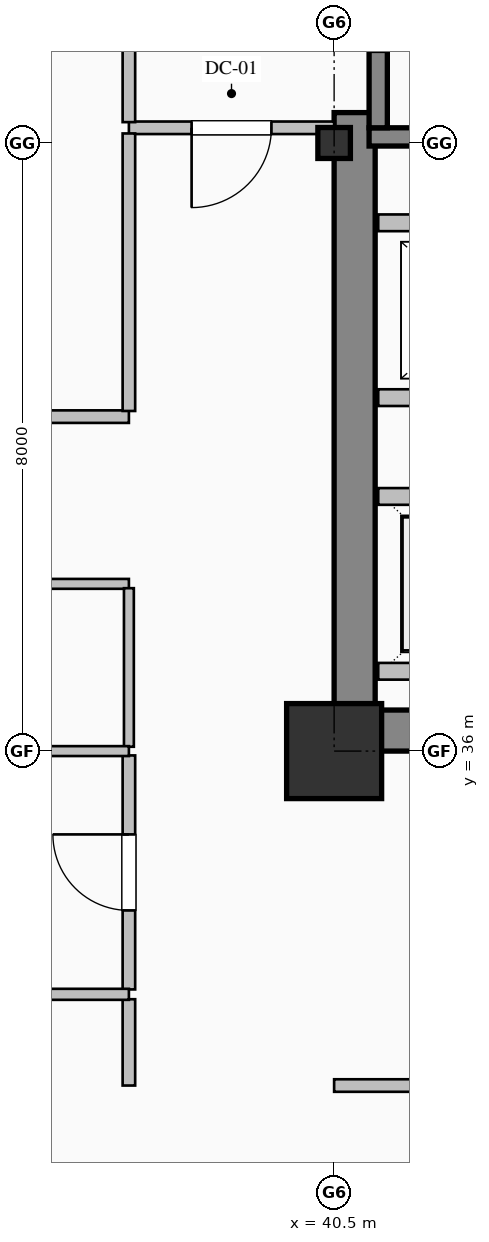
"""IFC4 building model, lengths in metres.
Left out: names, types, materials, properties, quantities, classifications, styles, units other than length and angle.
Written with IfcOpenShell. Run it as: python <this file> out.ifc"""

import sys

from ifc_helpers import new_model, si_unit, direction, frame, frame_2d, origin, origin_2d, place, context, subcontext, project, spatial, rectangle, hollow_rectangle, i_section, extrude, element, fill, save


model = new_model("IFC4")
c1 = context("Model", 3, precision=1e-05, world=origin(), true_north=direction((0.0, 1.0)))
c2 = subcontext(c1, "Body", "Model", "MODEL_VIEW")
j1 = project(units=[si_unit("LENGTHUNIT", "METRE"), si_unit("PLANEANGLEUNIT", "RADIAN")], contexts=[c1])
p1 = place(None, origin())
s1 = spatial("IfcSite", under=j1, at=p1, CompositionType="ELEMENT")
p2 = place(p1, origin())
s2 = spatial("IfcBuilding", under=s1, at=p2, CompositionType="ELEMENT")
p3 = place(p2, frame((0.0, 0.0, 44.2)))
s3 = spatial("IfcBuildingStorey", under=s2, at=p3, CompositionType="ELEMENT", Elevation=44.2)
p4 = place(p3, frame((40.77, 36.54, 0.0), z_axis=(0.0, 0.0, 1.0), x_axis=(0.0, 1.0, 0.0)))
e1 = element("IfcWall", 1, at=p4, inside=s3, PredefinedType="SHEAR", context=c2, shape_type="SweptSolid", body=[
    extrude(rectangle(XDim=7.86, YDim=0.54, at=frame_2d((3.93, 0.0))), origin(), (0.0, 0.0, 1.0), 3.75),
])
p5 = place(p3, frame((40.5, 36.27, 0.0), z_axis=(0.0, 0.0, 1.0), x_axis=(1.0, 0.0, 0.0)))
e2 = element("IfcWall", 2, at=p5, inside=s3, PredefinedType="SHEAR", context=c2, shape_type="SweptSolid", body=[
    extrude(rectangle(XDim=1.7, YDim=0.54, at=frame_2d((0.85, 0.0))), origin(), (0.0, 0.0, 1.0), 3.75),
])
p6 = place(p3, frame((40.5, 36.0, 0.0), z_axis=(0.0, 0.0, 1.0), x_axis=(1.0, 0.0, 0.0)))
e3 = element("IfcColumn", 3, at=p6, inside=s3, PredefinedType="COLUMN", context=c2, shape_type="SweptSolid", body=[
    extrude(hollow_rectangle(XDim=1.25, YDim=1.25, WallThickness=0.045, at=origin_2d()), origin(), (0.0, 0.0, 1.0), 4.0),
])
p7 = place(p3, frame((40.5, 44.0, 0.0), z_axis=(0.0, 0.0, 1.0), x_axis=(1.0, 0.0, 0.0)))
e4 = element("IfcColumn", 4, at=p7, inside=s3, PredefinedType="COLUMN", context=c2, shape_type="SweptSolid", body=[
    extrude(i_section(OverallWidth=0.407, OverallDepth=0.428, WebThickness=0.02, FlangeThickness=0.035, FilletRadius=0.022, at=origin_2d()), origin(), (0.0, 0.0, 1.0), 4.0),
])
p8 = place(p3, frame((49.04, 44.08, 0.0), z_axis=(0.0, 0.0, 1.0), x_axis=(-1.0, 0.0, 0.0)))
e5 = element("IfcWall", 5, at=p8, inside=s3, PredefinedType="SOLIDWALL", context=c2, shape_type="SweptSolid", body=[
    extrude(rectangle(XDim=8.08, YDim=0.24, at=frame_2d((4.04, 0.0))), origin(), (0.0, 0.0, 1.0), 4.0),
])
p9 = place(p3, frame((41.08, 47.35, 0.0), z_axis=(0.0, 0.0, 1.0), x_axis=(0.0, -1.0, 0.0)))
e6 = element("IfcWall", 6, at=p9, inside=s3, PredefinedType="SOLIDWALL", context=c2, shape_type="SweptSolid", body=[
    extrude(rectangle(XDim=3.15, YDim=0.24, at=frame_2d((1.575, 0.0))), origin(), (0.0, 0.0, 1.0), 4.0),
])
p10 = place(p9, frame((1.0, 0.0, 0.0)))
e7 = element("IfcOpeningElement", 7, at=p10, cuts=e6, PredefinedType="OPENING", context=c2, shape_type="SweptSolid", body=[
    extrude(rectangle(XDim=1.15, YDim=2.2, at=frame_2d((0.575, 1.1))), frame((0.0, 0.13, 0.0), z_axis=(0.0, -1.0, 0.0), x_axis=(1.0, 0.0, 0.0)), (0.0, 0.0, 1.0), 0.26),
])
p11 = place(p3, frame((49.32, 37.05, 0.0), z_axis=(0.0, 0.0, 1.0), x_axis=(-1.0, 0.0, 0.0)))
e8 = element("IfcWall", 8, at=p11, inside=s3, PredefinedType="PARTITIONING", context=c2, shape_type="SweptSolid", body=[
    extrude(rectangle(XDim=8.24, YDim=0.22, at=frame_2d((4.12, 0.0))), origin(), (0.0, 0.0, 1.0), 3.75),
])
p12 = place(p11, frame((6.37, 0.0, 0.0)))
e9 = element("IfcOpeningElement", 9, at=p12, cuts=e8, PredefinedType="OPENING", context=c2, shape_type="SweptSolid", body=[
    extrude(rectangle(XDim=1.1, YDim=2.2, at=frame_2d((0.55, 1.1))), frame((0.0, 0.12, 0.0), z_axis=(0.0, -1.0, 0.0), x_axis=(1.0, 0.0, 0.0)), (0.0, 0.0, 1.0), 0.24),
])
p13 = place(p11, frame((3.57, 0.0, 0.0)))
e10 = element("IfcOpeningElement", 10, at=p13, cuts=e8, PredefinedType="OPENING", context=c2, shape_type="SweptSolid", body=[
    extrude(rectangle(XDim=1.1, YDim=2.2, at=frame_2d((0.55, 1.1))), frame((0.0, 0.12, 0.0), z_axis=(0.0, -1.0, 0.0), x_axis=(1.0, 0.0, 0.0)), (0.0, 0.0, 1.0), 0.24),
])
p14 = place(p11, frame((0.77, 0.0, 0.0)))
e11 = element("IfcOpeningElement", 11, at=p14, cuts=e8, PredefinedType="OPENING", context=c2, shape_type="SweptSolid", body=[
    extrude(rectangle(XDim=1.1, YDim=2.2, at=frame_2d((0.55, 1.1))), frame((0.0, 0.12, 0.0), z_axis=(0.0, -1.0, 0.0), x_axis=(1.0, 0.0, 0.0)), (0.0, 0.0, 1.0), 0.24),
])
for number, where, z_axis, x_axis in (
    (12, (41.08, 39.35, 0.0), (0.0, 0.0, 1.0), (1.0, 0.0, 0.0)),
    (13, (49.32, 40.65, 0.0), (0.0, 0.0, 1.0), (-1.0, 0.0, 0.0)),
    (14, (41.08, 42.95, 0.0), (0.0, 0.0, 1.0), (1.0, 0.0, 0.0)),
):
    element("IfcWall", number, at=place(p3, frame(where, z_axis=z_axis, x_axis=x_axis)), inside=s3, PredefinedType="PARTITIONING", context=c2, shape_type="SweptSolid", body=[
        extrude(rectangle(XDim=8.24, YDim=0.22, at=frame_2d((4.12, 0.0))), origin(), (0.0, 0.0, 1.0), 3.75),
    ])
p15 = place(p3, frame((40.5, 44.2, 0.0), z_axis=(0.0, 0.0, 1.0), x_axis=(-1.0, 0.0, 0.0)))
e15 = element("IfcWall", 15, at=p15, inside=s3, PredefinedType="PARTITIONING", context=c2, shape_type="SweptSolid", body=[
    extrude(rectangle(XDim=2.7, YDim=0.165, at=frame_2d((1.35, 0.0))), origin(), (0.0, 0.0, 1.0), 3.75),
])
p16 = place(p15, frame((0.825, 0.0, 0.0)))
e16 = element("IfcOpeningElement", 16, at=p16, cuts=e15, PredefinedType="OPENING", context=c2, shape_type="SweptSolid", body=[
    extrude(rectangle(XDim=1.05, YDim=2.15, at=frame_2d((0.525, 1.075))), frame((0.0, 0.093, 0.0), z_axis=(0.0, -1.0, 0.0), x_axis=(1.0, 0.0, 0.0)), (0.0, 0.0, 1.0), 0.185),
])
p17 = place(p3, frame((37.8, 44.274, 0.0), z_axis=(0.0, 0.0, 1.0), x_axis=(0.0, 1.0, 0.0)))
e17 = element("IfcWall", 17, at=p17, inside=s3, PredefinedType="PARTITIONING", context=c2, shape_type="SweptSolid", body=[
    extrude(rectangle(XDim=3.051, YDim=0.165, at=frame_2d((1.525, 0.0))), origin(), (0.0, 0.0, 1.0), 3.75),
])
p18 = place(p3, frame((32.5, 40.4, 0.0), z_axis=(0.0, 0.0, 1.0), x_axis=(1.0, 0.0, 0.0)))
e18 = element("IfcWall", 18, at=p18, inside=s3, PredefinedType="PARTITIONING", context=c2, shape_type="SweptSolid", body=[
    extrude(rectangle(XDim=5.3, YDim=0.165, at=frame_2d((2.65, 0.0))), origin(), (0.0, 0.0, 1.0), 3.75),
])
p19 = place(p18, frame((2.1, 0.0, 0.0)))
e19 = element("IfcOpeningElement", 19, at=p19, cuts=e18, PredefinedType="OPENING", context=c2, shape_type="SweptSolid", body=[
    extrude(rectangle(XDim=1.1, YDim=2.2, at=frame_2d((0.55, 1.1))), frame((0.0, 0.093, 0.0), z_axis=(0.0, -1.0, 0.0), x_axis=(1.0, 0.0, 0.0)), (0.0, 0.0, 1.0), 0.185),
])
p20 = place(p3, frame((37.8, 38.2, 0.0), z_axis=(0.0, 0.0, 1.0), x_axis=(-1.0, 0.0, 0.0)))
e20 = element("IfcWall", 20, at=p20, inside=s3, PredefinedType="PARTITIONING", context=c2, shape_type="SweptSolid", body=[
    extrude(rectangle(XDim=28.8, YDim=0.13, at=frame_2d((14.4, 0.0))), origin(), (0.0, 0.0, 1.0), 3.75),
])
p21 = place(p20, frame((13.9, 0.0, 0.0)))
e21 = element("IfcOpeningElement", 21, at=p21, cuts=e20, PredefinedType="OPENING", context=c2, shape_type="SweptSolid", body=[
    extrude(rectangle(XDim=1.0, YDim=2.15, at=frame_2d((0.5, 1.075))), frame((0.0, 0.075, 0.0), z_axis=(0.0, -1.0, 0.0), x_axis=(1.0, 0.0, 0.0)), (0.0, 0.0, 1.0), 0.15),
])
p22 = place(p3, frame((37.8, 40.475, 0.0), z_axis=(0.0, 0.0, 1.0), x_axis=(0.0, 1.0, 0.0)))
e22 = element("IfcWall", 22, at=p22, inside=s3, PredefinedType="PARTITIONING", context=c2, shape_type="SweptSolid", body=[
    extrude(rectangle(XDim=3.651, YDim=0.165, at=frame_2d((1.825, 0.0))), origin(), (0.0, 0.0, 1.0), 3.75),
])
p23 = place(p3, frame((37.8, 31.6, 0.0), z_axis=(0.0, 0.0, 1.0), x_axis=(0.0, 1.0, 0.0)))
e23 = element("IfcWall", 23, at=p23, inside=s3, PredefinedType="PARTITIONING", context=c2, shape_type="SweptSolid", body=[
    extrude(rectangle(XDim=1.135, YDim=0.165, at=frame_2d((0.568, 0.0))), origin(), (0.0, 0.0, 1.0), 3.75),
])
p24 = place(p3, frame((37.8, 32.865, 0.0), z_axis=(0.0, 0.0, 1.0), x_axis=(0.0, 1.0, 0.0)))
e24 = element("IfcWall", 24, at=p24, inside=s3, PredefinedType="PARTITIONING", context=c2, shape_type="SweptSolid", body=[
    extrude(rectangle(XDim=3.079, YDim=0.165, at=frame_2d((1.539, 0.0))), origin(), (0.0, 0.0, 1.0), 3.75),
])
p25 = place(p24, frame((1.039, 0.0, 0.0)))
e25 = element("IfcOpeningElement", 25, at=p25, cuts=e24, PredefinedType="OPENING", context=c2, shape_type="SweptSolid", body=[
    extrude(rectangle(XDim=1.0, YDim=2.15, at=frame_2d((0.5, 1.075))), frame((0.0, 0.093, 0.0), z_axis=(0.0, -1.0, 0.0), x_axis=(1.0, 0.0, 0.0)), (0.0, 0.0, 1.0), 0.185),
])
p26 = place(p3, frame((37.8, 36.057, 0.0), z_axis=(0.0, 0.0, 1.0), x_axis=(0.0, 1.0, 0.0)))
e26 = element("IfcWall", 26, at=p26, inside=s3, PredefinedType="PARTITIONING", context=c2, shape_type="SweptSolid", body=[
    extrude(rectangle(XDim=2.086, YDim=0.13, at=frame_2d((1.043, 0.0))), origin(), (0.0, 0.0, 1.0), 3.75),
])
p27 = place(p3, frame((43.0, 31.6, 0.0), z_axis=(0.0, 0.0, 1.0), x_axis=(-1.0, 0.0, 0.0)))
e27 = element("IfcWall", 27, at=p27, inside=s3, PredefinedType="PARTITIONING", context=c2, shape_type="SweptSolid", body=[
    extrude(rectangle(XDim=2.5, YDim=0.165, at=frame_2d((1.25, 0.0))), origin(), (0.0, 0.0, 1.0), 3.75),
])
p28 = place(p3, frame((0.332, 32.8, 0.0), z_axis=(0.0, 0.0, 1.0), x_axis=(1.0, 0.0, 0.0)))
e28 = element("IfcWall", 28, at=p28, inside=s3, PredefinedType="PARTITIONING", context=c2, shape_type="SweptSolid", body=[
    extrude(rectangle(XDim=37.468, YDim=0.145, at=frame_2d((18.734, 0.0))), origin(), (0.0, 0.0, 1.0), 3.75),
])
p29 = place(p28, frame((18.234, 0.0, 0.0)))
e29 = element("IfcOpeningElement", 29, at=p29, cuts=e28, PredefinedType="OPENING", context=c2, shape_type="SweptSolid", body=[
    extrude(rectangle(XDim=1.0, YDim=2.15, at=frame_2d((0.5, 1.075))), frame((0.0, 0.083, 0.0), z_axis=(0.0, -1.0, 0.0), x_axis=(1.0, 0.0, 0.0)), (0.0, 0.0, 1.0), 0.165),
])
p30 = place(p3, frame((0.332, 36.0, 0.0), z_axis=(0.0, 0.0, 1.0), x_axis=(1.0, 0.0, 0.0)))
e30 = element("IfcWall", 30, at=p30, inside=s3, PredefinedType="PARTITIONING", context=c2, shape_type="SweptSolid", body=[
    extrude(rectangle(XDim=37.468, YDim=0.13, at=frame_2d((18.734, 0.0))), origin(), (0.0, 0.0, 1.0), 3.042),
])
p31 = place(p16, origin())
e31 = element("IfcDoor", 31, at=p31, inside=s3, OperationType="SINGLE_SWING_RIGHT", PredefinedType="DOOR", context=c2, shape_type="SweptSolid", body=[
    extrude(rectangle(XDim=1.05, YDim=2.15, at=frame_2d((0.525, 1.075))), frame((0.0, 0.025, 0.0), z_axis=(0.0, -1.0, 0.0), x_axis=(1.0, 0.0, 0.0)), (0.0, 0.0, 1.0), 0.05),
])
fill(e16, e31)
p32 = place(p25, origin())
e32 = element("IfcDoor", 32, at=p32, inside=s3, OperationType="SINGLE_SWING_RIGHT", PredefinedType="DOOR", context=c2, shape_type="SweptSolid", body=[
    extrude(rectangle(XDim=1.0, YDim=2.15, at=frame_2d((0.5, 1.075))), frame((0.0, 0.025, 0.0), z_axis=(0.0, -1.0, 0.0), x_axis=(1.0, 0.0, 0.0)), (0.0, 0.0, 1.0), 0.05),
])
fill(e25, e32)
save(model, sys.argv[1])
